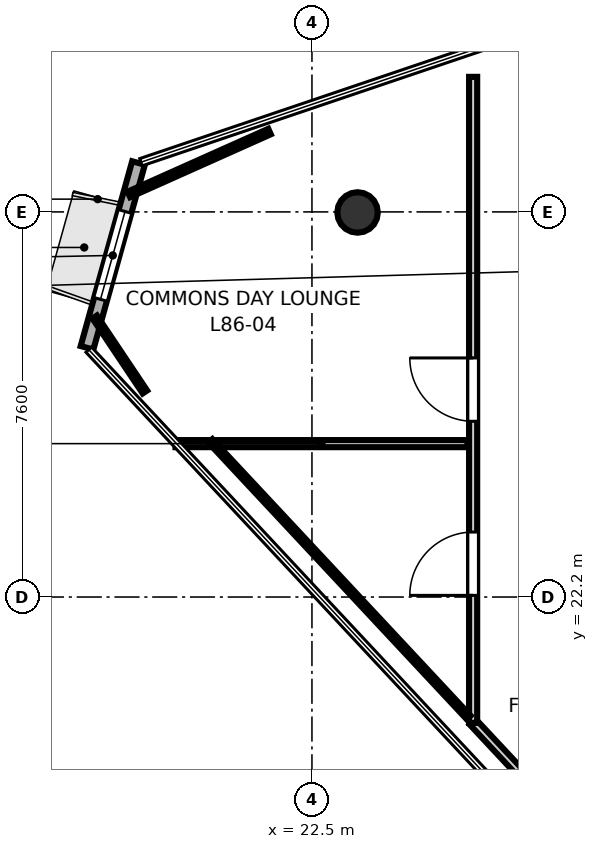
"""IFC4 building model, lengths in metres.
Left out: names, types, materials, properties, quantities, classifications, styles, units other than length and angle.
Written with IfcOpenShell. Run it as: python <this file> out.ifc"""

import sys

from ifc_helpers import new_model, si_unit, direction, frame, frame_2d, origin, origin_2d, place, context, subcontext, project, spatial, rectangle, hollow_circle, extrude, element, fill, save


model = new_model("IFC4")
c1 = context("Model", 3, precision=1e-05, world=origin(), true_north=direction((0.0, 1.0)))
c2 = subcontext(c1, "Body", "Model", "MODEL_VIEW")
j1 = project(units=[si_unit("LENGTHUNIT", "METRE"), si_unit("PLANEANGLEUNIT", "RADIAN")], contexts=[c1])
p1 = place(None, origin())
s1 = spatial("IfcSite", under=j1, at=p1, CompositionType="ELEMENT")
p2 = place(p1, origin())
s2 = spatial("IfcBuilding", under=s1, at=p2, CompositionType="ELEMENT")
p3 = place(p2, frame((0.0, 0.0, 333.3)))
s3 = spatial("IfcBuildingStorey", under=s2, at=p3, CompositionType="ELEMENT", Elevation=333.3)
p4 = place(p3, frame((23.4, 29.789, 0.0), z_axis=(0.0, 0.0, 1.0), x_axis=(1.0, 0.0, 0.0)))
e1 = element("IfcColumn", 1, at=p4, inside=s3, PredefinedType="COLUMN", context=c2, shape_type="SweptSolid", body=[
    extrude(hollow_circle(Radius=0.4, WallThickness=0.022, at=origin_2d()), origin(), (0.0, 0.0, 1.0), 3.7),
])
p5 = place(p3, frame((19.077, 30.765, 0.0), z_axis=(0.0, 0.0, 1.0), x_axis=(-0.268471972046, -0.963287496143, 0.0)))
e2 = element("IfcWall", 2, at=p5, inside=s3, PredefinedType="SOLIDWALL", context=c2, shape_type="SweptSolid", body=[
    extrude(rectangle(XDim=3.786, YDim=0.26, at=frame_2d((1.893, 0.0))), origin(), (0.0, 0.0, 1.0), 3.52),
])
p6 = place(p5, frame((0.993, 0.0, 0.85)))
e3 = element("IfcOpeningElement", 3, at=p6, cuts=e2, PredefinedType="OPENING", context=c2, shape_type="SweptSolid", body=[
    extrude(rectangle(XDim=1.8, YDim=2.1, at=frame_2d((0.9, 1.05))), frame((0.0, 0.14, 0.0), z_axis=(0.0, -1.0, 0.0), x_axis=(1.0, 0.0, 0.0)), (0.0, 0.0, 1.0), 0.28),
])
p7 = place(p3, frame((26.995, 18.321, 0.0), z_axis=(0.0, 0.0, 1.0), x_axis=(-0.682560687031, 0.730828918776, 0.0)))
e4 = element("IfcWall", 4, at=p7, inside=s3, PredefinedType="PARTITIONING", context=c2, shape_type="SweptSolid", body=[
    extrude(rectangle(XDim=1.937, YDim=0.16, at=frame_2d((0.969, 0.0))), origin(), (0.0, 0.0, 1.0), 2.84),
])
p8 = place(p3, frame((25.681, 19.716, 0.0), z_axis=(0.0, 0.0, 1.0), x_axis=(0.0, 1.0, 0.0)))
e5 = element("IfcWall", 5, at=p8, inside=s3, PredefinedType="PARTITIONING", context=c2, shape_type="SweptSolid", body=[
    extrude(rectangle(XDim=12.749, YDim=0.16, at=frame_2d((6.375, 0.0))), origin(), (0.0, 0.0, 1.0), 2.84),
])
p9 = place(p8, frame((2.516, 0.0, 0.0)))
e6 = element("IfcOpeningElement", 6, at=p9, cuts=e5, PredefinedType="OPENING", context=c2, shape_type="SweptSolid", body=[
    extrude(rectangle(XDim=1.25, YDim=2.2, at=frame_2d((0.625, 1.1))), frame((0.0, 0.09, 0.0), z_axis=(0.0, -1.0, 0.0), x_axis=(1.0, 0.0, 0.0)), (0.0, 0.0, 1.0), 0.18),
])
p10 = place(p8, frame((5.952, 0.0, 0.0)))
e7 = element("IfcOpeningElement", 7, at=p10, cuts=e5, PredefinedType="OPENING", context=c2, shape_type="SweptSolid", body=[
    extrude(rectangle(XDim=1.25, YDim=2.2, at=frame_2d((0.625, 1.1))), frame((0.0, 0.09, 0.0), z_axis=(0.0, -1.0, 0.0), x_axis=(1.0, 0.0, 0.0)), (0.0, 0.0, 1.0), 0.18),
])
p11 = place(p3, frame((19.806, 25.227, 0.0), z_axis=(0.0, 0.0, 1.0), x_axis=(1.0, 0.0, 0.0)))
e8 = element("IfcWall", 8, at=p11, inside=s3, PredefinedType="PARTITIONING", context=c2, shape_type="SweptSolid", body=[
    extrude(rectangle(XDim=5.764, YDim=0.14, at=frame_2d((2.882, 0.0))), origin(), (0.0, 0.0, 1.0), 2.84),
])
p12 = place(p3, frame((25.593, 19.823, 0.0), z_axis=(0.0, 0.0, 1.0), x_axis=(-0.68251047359, 0.730875812598, 0.0)))
e9 = element("IfcWall", 9, at=p12, inside=s3, PredefinedType="PARTITIONING", context=c2, shape_type="SweptSolid", body=[
    extrude(rectangle(XDim=7.466, YDim=0.105, at=frame_2d((3.733, 0.0))), origin(), (0.0, 0.0, 1.0), 2.84),
])
p13 = place(p3, frame((19.203, 26.246, 0.0), z_axis=(0.0, 0.0, 1.0), x_axis=(-0.556280915469, 0.830994309899, 0.0)))
e10 = element("IfcWall", 10, at=p13, inside=s3, PredefinedType="PARTITIONING", context=c2, shape_type="SweptSolid", body=[
    extrude(rectangle(XDim=1.781, YDim=0.105, at=frame_2d((0.891, 0.0))), origin(), (0.0, 0.0, 1.0), 2.84),
])
p14 = place(p3, frame((18.887, 30.145, 0.0), z_axis=(0.0, 0.0, 1.0), x_axis=(0.91294188189, 0.408089598361, 0.0)))
e11 = element("IfcWall", 11, at=p14, inside=s3, PredefinedType="PARTITIONING", context=c2, shape_type="SweptSolid", body=[
    extrude(rectangle(XDim=3.04, YDim=0.12, at=frame_2d((1.52, 0.0))), origin(), (0.0, 0.0, 1.0), 2.84),
])
p15 = place(p9, origin())
e12 = element("IfcDoor", 12, at=p15, inside=s3, OperationType="SINGLE_SWING_LEFT", PredefinedType="DOOR", context=c2, shape_type="SweptSolid", body=[
    extrude(rectangle(XDim=1.25, YDim=2.2, at=frame_2d((0.625, 1.1))), frame((0.0, 0.025, 0.0), z_axis=(0.0, -1.0, 0.0), x_axis=(1.0, 0.0, 0.0)), (0.0, 0.0, 1.0), 0.05),
])
fill(e6, e12)
p16 = place(p10, origin())
e13 = element("IfcDoor", 13, at=p16, inside=s3, OperationType="SINGLE_SWING_RIGHT", PredefinedType="DOOR", context=c2, shape_type="SweptSolid", body=[
    extrude(rectangle(XDim=1.25, YDim=2.2, at=frame_2d((0.625, 1.1))), frame((0.0, 0.025, 0.0), z_axis=(0.0, -1.0, 0.0), x_axis=(1.0, 0.0, 0.0)), (0.0, 0.0, 1.0), 0.05),
])
fill(e7, e13)
p17 = place(p6, origin())
e14 = element("IfcWindow", 14, at=p17, inside=s3, PartitioningType="SINGLE_PANEL", PredefinedType="WINDOW", context=c2, shape_type="SweptSolid", body=[
    extrude(rectangle(XDim=1.8, YDim=2.1, at=frame_2d((0.9, 1.05))), frame((0.0, 0.03, 0.0), z_axis=(0.0, -1.0, 0.0), x_axis=(1.0, 0.0, 0.0)), (0.0, 0.0, 1.0), 0.06),
])
fill(e3, e14)
save(model, sys.argv[1])
